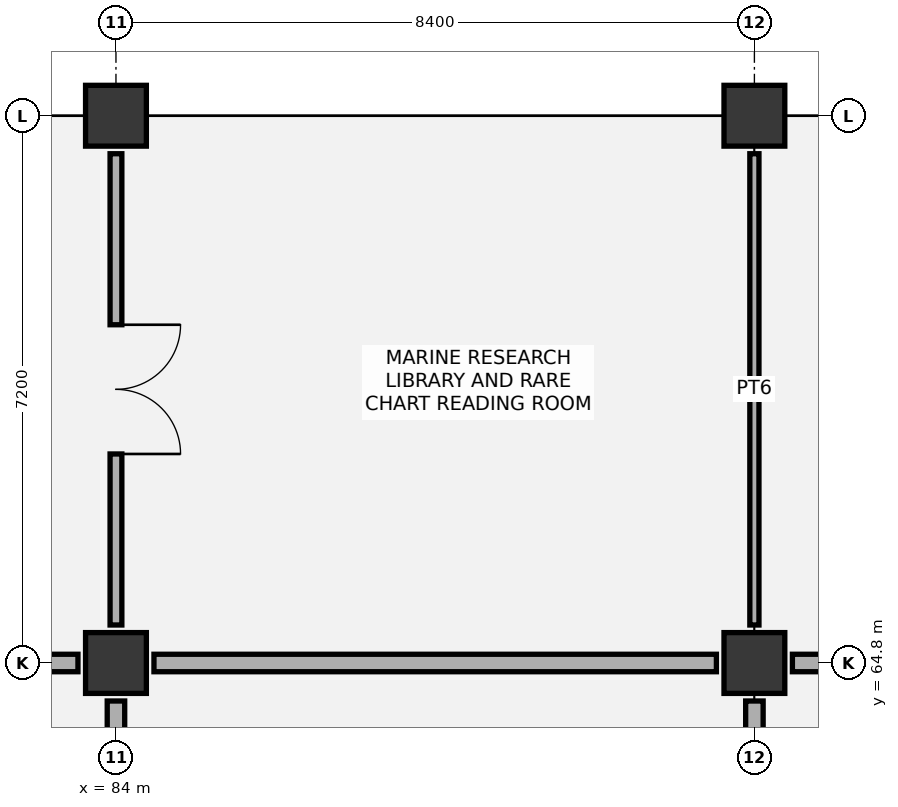
"""IFC4 building model, lengths in metres.
Left out: names, types, materials, properties, quantities, classifications, styles, units other than length and angle.
Written with IfcOpenShell. Run it as: python <this file> out.ifc"""

import sys

from ifc_helpers import new_model, si_unit, direction, frame, frame_2d, origin, origin_2d, place, context, subcontext, project, spatial, rectangle, extrude, element, fill, save


model = new_model("IFC4")
c1 = context("Model", 3, precision=1e-05, world=origin(), true_north=direction((0.0, 1.0)))
c2 = subcontext(c1, "Body", "Model", "MODEL_VIEW")
j1 = project(units=[si_unit("LENGTHUNIT", "METRE"), si_unit("PLANEANGLEUNIT", "RADIAN")], contexts=[c1])
p1 = place(None, origin())
s1 = spatial("IfcSite", under=j1, at=p1, CompositionType="ELEMENT")
p2 = place(p1, origin())
s2 = spatial("IfcBuilding", under=s1, at=p2, CompositionType="ELEMENT")
p3 = place(p2, frame((0.0, 0.0, 22.2)))
s3 = spatial("IfcBuildingStorey", under=s2, at=p3, CompositionType="ELEMENT", Elevation=22.2)
for number, where, z_axis, x_axis in (
    (1, (84.0, 64.8, 0.0), (0.0, 0.0, 1.0), (1.0, 0.0, 0.0)),
    (2, (84.0, 72.0, 0.0), (0.0, 0.0, 1.0), (1.0, 0.0, 0.0)),
    (3, (92.4, 64.8, 0.0), (0.0, 0.0, 1.0), (1.0, 0.0, 0.0)),
    (4, (92.4, 72.0, 0.0), (0.0, 0.0, 1.0), (1.0, 0.0, 0.0)),
):
    element("IfcColumn", number, at=place(p3, frame(where, z_axis=z_axis, x_axis=x_axis)), inside=s3, PredefinedType="COLUMN", context=c2, shape_type="SweptSolid", body=[
        extrude(rectangle(XDim=0.8, YDim=0.8, at=origin_2d()), origin(), (0.0, 0.0, 1.0), 4.8),
    ])
p4 = place(p3, frame((84.0, 58.1, 0.0), z_axis=(0.0, 0.0, 1.0), x_axis=(0.0, 1.0, 0.0)))
e5 = element("IfcWall", 5, at=p4, inside=s3, PredefinedType="PARTITIONING", context=c2, shape_type="SweptSolid", body=[
    extrude(rectangle(XDim=6.2, YDim=0.23, at=frame_2d((3.1, 0.0))), origin(), (0.0, 0.0, 1.0), 4.015),
])
p5 = place(p4, frame((0.25, 0.0, 0.0)))
e6 = element("IfcOpeningElement", 6, at=p5, cuts=e5, PredefinedType="OPENING", context=c2, shape_type="SweptSolid", body=[
    extrude(rectangle(XDim=1.05, YDim=2.15, at=frame_2d((0.525, 1.075))), frame((0.0, 0.125, 0.0), z_axis=(0.0, -1.0, 0.0), x_axis=(1.0, 0.0, 0.0)), (0.0, 0.0, 1.0), 0.25),
])
p6 = place(p3, frame((76.1, 64.8, 0.0), z_axis=(0.0, 0.0, 1.0), x_axis=(1.0, 0.0, 0.0)))
e7 = element("IfcWall", 7, at=p6, inside=s3, PredefinedType="PARTITIONING", context=c2, shape_type="SweptSolid", body=[
    extrude(rectangle(XDim=7.4, YDim=0.23, at=frame_2d((3.7, 0.0))), origin(), (0.0, 0.0, 1.0), 3.815),
])
p7 = place(p3, frame((84.0, 65.3, 0.0), z_axis=(0.0, 0.0, 1.0), x_axis=(0.0, 1.0, 0.0)))
e8 = element("IfcWall", 8, at=p7, inside=s3, PredefinedType="PARTITIONING", context=c2, shape_type="SweptSolid", body=[
    extrude(rectangle(XDim=6.2, YDim=0.155, at=frame_2d((3.1, 0.0))), origin(), (0.0, 0.0, 1.0), 3.865),
])
p8 = place(p7, frame((2.25, 0.0, 0.0)))
e9 = element("IfcOpeningElement", 9, at=p8, cuts=e8, PredefinedType="OPENING", context=c2, shape_type="SweptSolid", body=[
    extrude(rectangle(XDim=1.7, YDim=2.25, at=frame_2d((0.85, 1.125))), frame((0.0, 0.087, 0.0), z_axis=(0.0, -1.0, 0.0), x_axis=(1.0, 0.0, 0.0)), (0.0, 0.0, 1.0), 0.175),
])
p9 = place(p3, frame((92.4, 58.1, 0.0), z_axis=(0.0, 0.0, 1.0), x_axis=(0.0, 1.0, 0.0)))
e10 = element("IfcWall", 10, at=p9, inside=s3, PredefinedType="PARTITIONING", context=c2, shape_type="SweptSolid", body=[
    extrude(rectangle(XDim=6.2, YDim=0.23, at=frame_2d((3.1, 0.0))), origin(), (0.0, 0.0, 1.0), 3.865),
])
p10 = place(p9, frame((0.25, 0.0, 0.0)))
e11 = element("IfcOpeningElement", 11, at=p10, cuts=e10, PredefinedType="OPENING", context=c2, shape_type="SweptSolid", body=[
    extrude(rectangle(XDim=1.05, YDim=2.15, at=frame_2d((0.525, 1.075))), frame((0.0, 0.125, 0.0), z_axis=(0.0, -1.0, 0.0), x_axis=(1.0, 0.0, 0.0)), (0.0, 0.0, 1.0), 0.25),
])
p11 = place(p3, frame((84.5, 64.8, 0.0), z_axis=(0.0, 0.0, 1.0), x_axis=(1.0, 0.0, 0.0)))
e12 = element("IfcWall", 12, at=p11, inside=s3, PredefinedType="PARTITIONING", context=c2, shape_type="SweptSolid", body=[
    extrude(rectangle(XDim=7.4, YDim=0.23, at=frame_2d((3.7, 0.0))), origin(), (0.0, 0.0, 1.0), 3.815),
])
p12 = place(p3, frame((92.4, 65.3, 0.0), z_axis=(0.0, 0.0, 1.0), x_axis=(0.0, 1.0, 0.0)))
e13 = element("IfcWall", 13, at=p12, inside=s3, PredefinedType="PARTITIONING", context=c2, shape_type="SweptSolid", body=[
    extrude(rectangle(XDim=6.2, YDim=0.12, at=frame_2d((3.1, 0.0))), origin(), (0.0, 0.0, 1.0), 4.115),
])
p13 = place(p3, frame((92.9, 64.8, 0.0), z_axis=(0.0, 0.0, 1.0), x_axis=(1.0, 0.0, 0.0)))
e14 = element("IfcWall", 14, at=p13, inside=s3, PredefinedType="PARTITIONING", context=c2, shape_type="SweptSolid", body=[
    extrude(rectangle(XDim=7.4, YDim=0.23, at=frame_2d((3.7, 0.0))), origin(), (0.0, 0.0, 1.0), 3.815),
])
p14 = place(p8, frame((1.7, 0.0, 0.0), z_axis=(0.0, 0.0, 1.0), x_axis=(-1.0, 0.0, 0.0)))
e15 = element("IfcDoor", 15, at=p14, inside=s3, OperationType="DOUBLE_DOOR_SINGLE_SWING", PredefinedType="DOOR", context=c2, shape_type="SweptSolid", body=[
    extrude(rectangle(XDim=1.7, YDim=2.25, at=frame_2d((0.85, 1.125))), frame((0.0, 0.025, 0.0), z_axis=(0.0, -1.0, 0.0), x_axis=(1.0, 0.0, 0.0)), (0.0, 0.0, 1.0), 0.05),
])
fill(e9, e15)
save(model, sys.argv[1])
